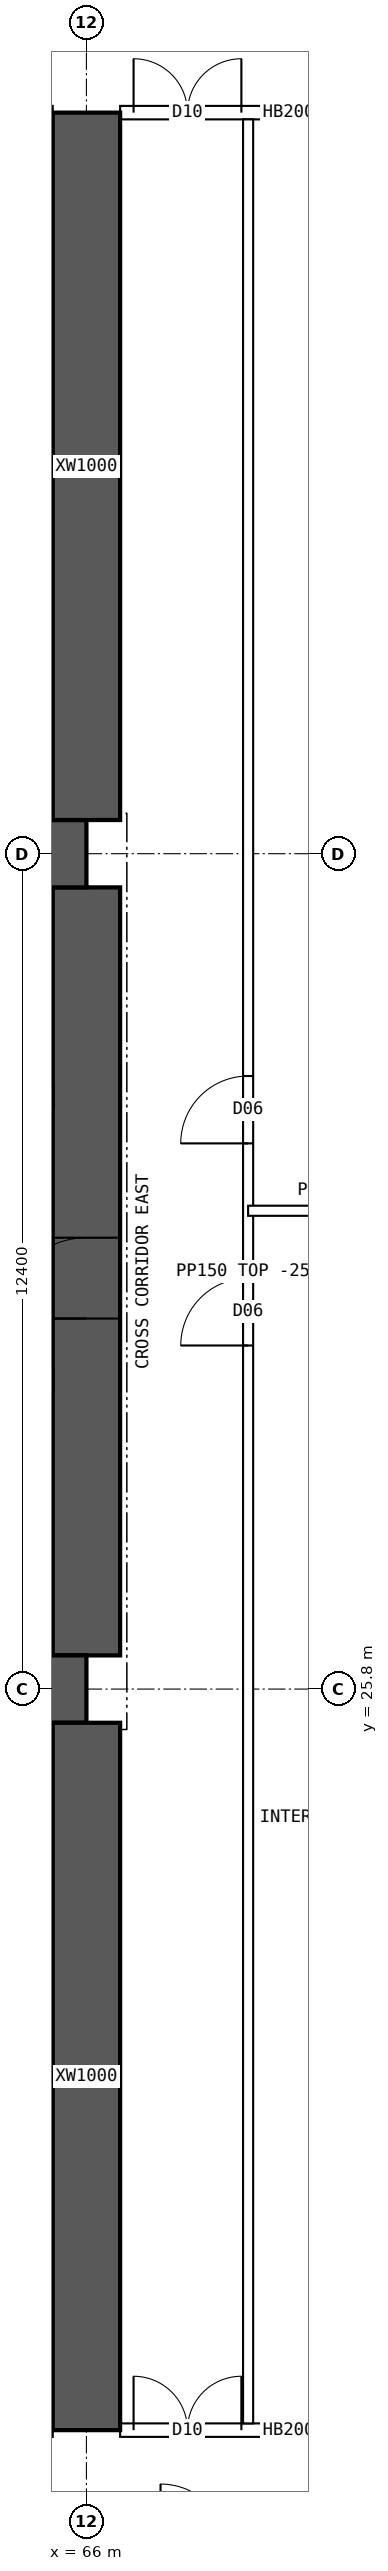
"""IFC4 building model, lengths in metres.
Left out: names, types, materials, properties, quantities, classifications, styles, units other than length and angle.
Written with IfcOpenShell. Run it as: python <this file> out.ifc"""

import sys

from ifc_helpers import new_model, si_unit, direction, frame, frame_2d, origin, place, context, subcontext, project, spatial, rectangle, extrude, element, fill, save


model = new_model("IFC4")
c1 = context("Model", 3, precision=1e-05, world=origin(), true_north=direction((0.0, 1.0)))
c2 = subcontext(c1, "Body", "Model", "MODEL_VIEW")
j1 = project(units=[si_unit("LENGTHUNIT", "METRE"), si_unit("PLANEANGLEUNIT", "RADIAN")], contexts=[c1])
p1 = place(None, origin())
s1 = spatial("IfcSite", under=j1, at=p1, CompositionType="ELEMENT")
p2 = place(p1, origin())
s2 = spatial("IfcBuilding", under=s1, at=p2, CompositionType="ELEMENT")
p3 = place(p2, frame((0.0, 0.0, 53.95)))
s3 = spatial("IfcBuildingStorey", under=s2, at=p3, CompositionType="ELEMENT", Elevation=53.95)
for number, where, z_axis, x_axis in (
    (1, (18.0, 25.8, 0.0), (0.0, 0.0, 1.0), (1.0, 0.0, 0.0)),
    (2, (18.0, 38.2, 0.0), (0.0, 0.0, 1.0), (1.0, 0.0, 0.0)),
):
    element("IfcWall", number, at=place(p3, frame(where, z_axis=z_axis, x_axis=x_axis)), inside=s3, PredefinedType="SHEAR", context=c2, shape_type="SweptSolid", body=[
        extrude(rectangle(XDim=48.0, YDim=1.0, at=frame_2d((24.0, 0.0))), origin(), (0.0, 0.0, 1.0), 3.75),
    ])
p4 = place(p3, frame((66.0, 26.3, 0.0), z_axis=(0.0, 0.0, 1.0), x_axis=(0.0, 1.0, 0.0)))
e3 = element("IfcWall", 3, at=p4, inside=s3, PredefinedType="SHEAR", context=c2, shape_type="SweptSolid", body=[
    extrude(rectangle(XDim=11.4, YDim=1.0, at=frame_2d((5.7, 0.0))), origin(), (0.0, 0.0, 1.0), 3.75),
])
p5 = place(p4, frame((5.0, 0.0, 0.0)))
e4 = element("IfcOpeningElement", 4, at=p5, cuts=e3, PredefinedType="OPENING", context=c2, shape_type="SweptSolid", body=[
    extrude(rectangle(XDim=1.2, YDim=2.1, at=frame_2d((0.6, 1.05))), frame((0.0, 0.51, 0.0), z_axis=(0.0, -1.0, 0.0), x_axis=(1.0, 0.0, 0.0)), (0.0, 0.0, 1.0), 1.02),
])
for number, where, z_axis, x_axis in (
    (5, (66.0, 14.8, 0.0), (0.0, 0.0, 1.0), (0.0, 1.0, 0.0)),
    (6, (66.0, 38.7, 0.0), (0.0, 0.0, 1.0), (0.0, 1.0, 0.0)),
):
    element("IfcWall", number, at=place(p3, frame(where, z_axis=z_axis, x_axis=x_axis)), inside=s3, PredefinedType="SHEAR", context=c2, shape_type="SweptSolid", body=[
        extrude(rectangle(XDim=10.5, YDim=1.0, at=frame_2d((5.25, 0.0))), origin(), (0.0, 0.0, 1.0), 3.75),
    ])
p6 = place(p3, frame((66.5, 14.8, 0.0), z_axis=(0.0, 0.0, 1.0), x_axis=(1.0, 0.0, 0.0)))
e7 = element("IfcWall", 7, at=p6, inside=s3, PredefinedType="SOLIDWALL", context=c2, shape_type="SweptSolid", body=[
    extrude(rectangle(XDim=5.0, YDim=0.2, at=frame_2d((2.5, 0.0))), origin(), (0.0, 0.0, 1.0), 3.5),
])
p7 = place(p6, frame((0.2, 0.0, 0.0)))
e8 = element("IfcOpeningElement", 8, at=p7, cuts=e7, PredefinedType="OPENING", context=c2, shape_type="SweptSolid", body=[
    extrude(rectangle(XDim=1.6, YDim=2.1, at=frame_2d((0.8, 1.05))), frame((0.0, 0.11, 0.0), z_axis=(0.0, -1.0, 0.0), x_axis=(1.0, 0.0, 0.0)), (0.0, 0.0, 1.0), 0.22),
])
p8 = place(p3, frame((66.5, 49.2, 0.0), z_axis=(0.0, 0.0, 1.0), x_axis=(1.0, 0.0, 0.0)))
e9 = element("IfcWall", 9, at=p8, inside=s3, PredefinedType="SOLIDWALL", context=c2, shape_type="SweptSolid", body=[
    extrude(rectangle(XDim=5.0, YDim=0.2, at=frame_2d((2.5, 0.0))), origin(), (0.0, 0.0, 1.0), 3.5),
])
p9 = place(p8, frame((0.2, 0.0, 0.0)))
e10 = element("IfcOpeningElement", 10, at=p9, cuts=e9, PredefinedType="OPENING", context=c2, shape_type="SweptSolid", body=[
    extrude(rectangle(XDim=1.6, YDim=2.1, at=frame_2d((0.8, 1.05))), frame((0.0, 0.11, 0.0), z_axis=(0.0, -1.0, 0.0), x_axis=(1.0, 0.0, 0.0)), (0.0, 0.0, 1.0), 0.22),
])
p10 = place(p3, frame((68.4, 14.9, 0.0), z_axis=(0.0, 0.0, 1.0), x_axis=(0.0, 1.0, 0.0)))
e11 = element("IfcWall", 11, at=p10, inside=s3, PredefinedType="PARTITIONING", context=c2, shape_type="SweptSolid", body=[
    extrude(rectangle(XDim=34.2, YDim=0.15, at=frame_2d((17.1, 0.0))), origin(), (0.0, 0.0, 1.0), 3.5),
])
p11 = place(p10, frame((16.0, 0.0, 0.0)))
e12 = element("IfcOpeningElement", 12, at=p11, cuts=e11, PredefinedType="OPENING", context=c2, shape_type="SweptSolid", body=[
    extrude(rectangle(XDim=1.0, YDim=2.1, at=frame_2d((0.5, 1.05))), frame((0.0, 0.085, 0.0), z_axis=(0.0, -1.0, 0.0), x_axis=(1.0, 0.0, 0.0)), (0.0, 0.0, 1.0), 0.17),
])
p12 = place(p10, frame((19.0, 0.0, 0.0)))
e13 = element("IfcOpeningElement", 13, at=p12, cuts=e11, PredefinedType="OPENING", context=c2, shape_type="SweptSolid", body=[
    extrude(rectangle(XDim=1.0, YDim=2.1, at=frame_2d((0.5, 1.05))), frame((0.0, 0.085, 0.0), z_axis=(0.0, -1.0, 0.0), x_axis=(1.0, 0.0, 0.0)), (0.0, 0.0, 1.0), 0.17),
])
p13 = place(p3, frame((68.4, 32.9, 0.0), z_axis=(0.0, 0.0, 1.0), x_axis=(1.0, 0.0, 0.0)))
e14 = element("IfcWall", 14, at=p13, inside=s3, PredefinedType="PARTITIONING", context=c2, shape_type="SweptSolid", body=[
    extrude(rectangle(XDim=3.6, YDim=0.15, at=frame_2d((1.8, 0.0))), origin(), (0.0, 0.0, 1.0), 3.5),
])
p14 = place(p5, origin())
e15 = element("IfcDoor", 15, at=p14, inside=s3, OperationType="SINGLE_SWING_LEFT", PredefinedType="DOOR", context=c2, shape_type="SweptSolid", body=[
    extrude(rectangle(XDim=1.2, YDim=2.1, at=frame_2d((0.6, 1.05))), frame((0.0, 0.025, 0.0), z_axis=(0.0, -1.0, 0.0), x_axis=(1.0, 0.0, 0.0)), (0.0, 0.0, 1.0), 0.05),
])
fill(e4, e15)
p15 = place(p7, origin())
e16 = element("IfcDoor", 16, at=p15, inside=s3, OperationType="DOUBLE_DOOR_SINGLE_SWING", PredefinedType="DOOR", context=c2, shape_type="SweptSolid", body=[
    extrude(rectangle(XDim=1.6, YDim=2.1, at=frame_2d((0.8, 1.05))), frame((0.0, 0.025, 0.0), z_axis=(0.0, -1.0, 0.0), x_axis=(1.0, 0.0, 0.0)), (0.0, 0.0, 1.0), 0.05),
])
fill(e8, e16)
p16 = place(p9, origin())
e17 = element("IfcDoor", 17, at=p16, inside=s3, OperationType="DOUBLE_DOOR_SINGLE_SWING", PredefinedType="DOOR", context=c2, shape_type="SweptSolid", body=[
    extrude(rectangle(XDim=1.6, YDim=2.1, at=frame_2d((0.8, 1.05))), frame((0.0, 0.025, 0.0), z_axis=(0.0, -1.0, 0.0), x_axis=(1.0, 0.0, 0.0)), (0.0, 0.0, 1.0), 0.05),
])
fill(e10, e17)
p17 = place(p11, origin())
e18 = element("IfcDoor", 18, at=p17, inside=s3, OperationType="SINGLE_SWING_LEFT", PredefinedType="DOOR", context=c2, shape_type="SweptSolid", body=[
    extrude(rectangle(XDim=1.0, YDim=2.1, at=frame_2d((0.5, 1.05))), frame((0.0, 0.025, 0.0), z_axis=(0.0, -1.0, 0.0), x_axis=(1.0, 0.0, 0.0)), (0.0, 0.0, 1.0), 0.05),
])
fill(e12, e18)
p18 = place(p12, origin())
e19 = element("IfcDoor", 19, at=p18, inside=s3, OperationType="SINGLE_SWING_LEFT", PredefinedType="DOOR", context=c2, shape_type="SweptSolid", body=[
    extrude(rectangle(XDim=1.0, YDim=2.1, at=frame_2d((0.5, 1.05))), frame((0.0, 0.025, 0.0), z_axis=(0.0, -1.0, 0.0), x_axis=(1.0, 0.0, 0.0)), (0.0, 0.0, 1.0), 0.05),
])
fill(e13, e19)
save(model, sys.argv[1])
